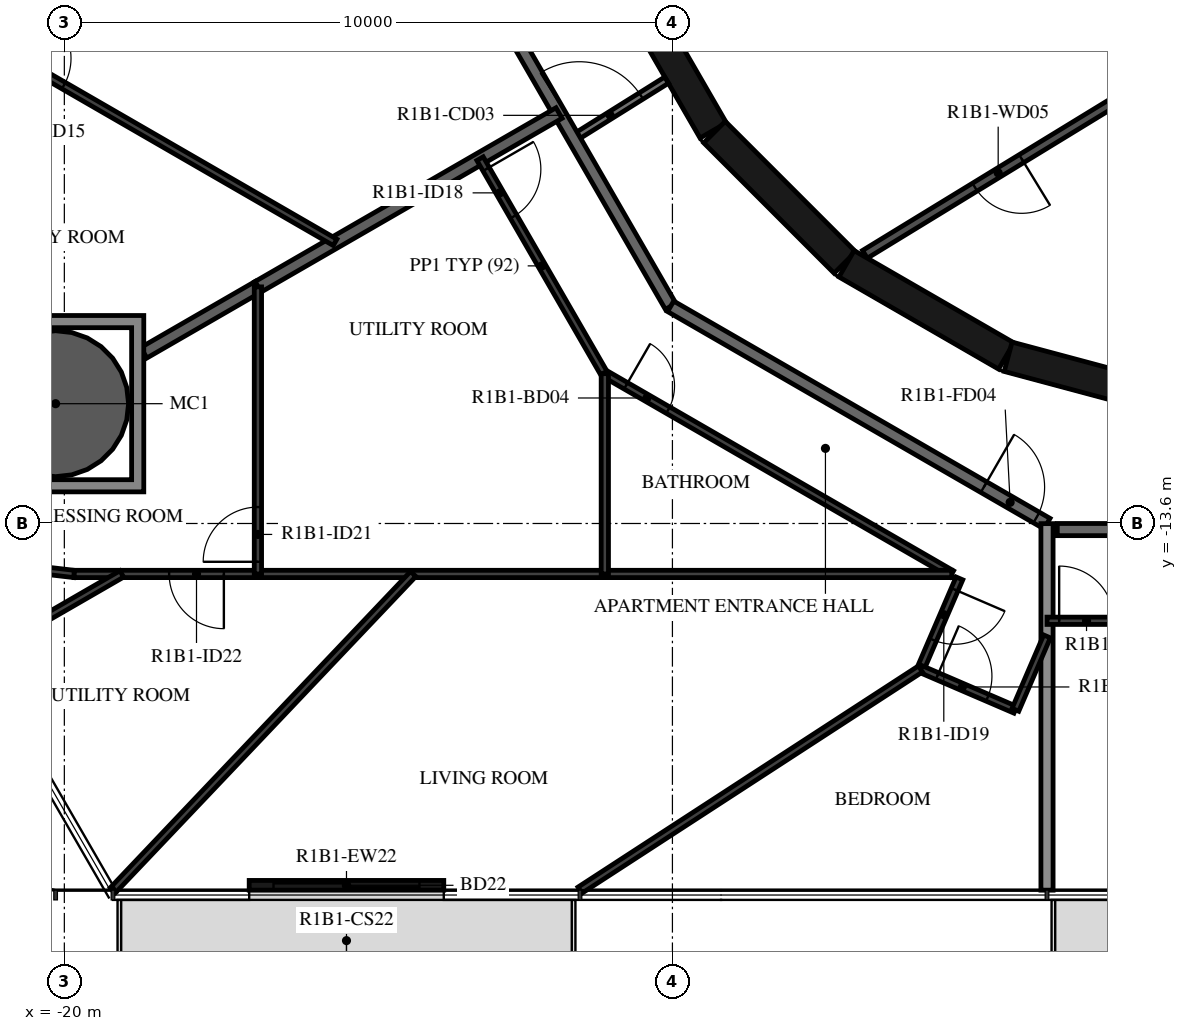
"""IFC4 building model, lengths in metres.
Left out: names, types, materials, properties, quantities, classifications, styles, units other than length and angle.
Written with IfcOpenShell. Run it as: python <this file> out.ifc"""

import sys

from ifc_helpers import new_model, si_unit, direction, frame, frame_2d, origin, origin_2d, place, context, subcontext, project, spatial, polyline, rectangle, hollow_circle, outline, extrude, element, fill, save


model = new_model("IFC4")
c1 = context("Model", 3, precision=1e-05, world=origin(), true_north=direction((0.0, 1.0)))
c2 = subcontext(c1, "Body", "Model", "MODEL_VIEW")
j1 = project(units=[si_unit("LENGTHUNIT", "METRE"), si_unit("PLANEANGLEUNIT", "RADIAN")], contexts=[c1])
p1 = place(None, origin())
s1 = spatial("IfcSite", under=j1, at=p1, CompositionType="ELEMENT")
p2 = place(p1, origin())
s2 = spatial("IfcBuilding", under=s1, at=p2, CompositionType="ELEMENT")
p3 = place(p2, frame((0.0, 0.0, 48.9)))
s3 = spatial("IfcBuildingStorey", under=s2, at=p3, CompositionType="ELEMENT", Elevation=48.9)
p4 = place(p3, frame((-20.144, -11.63, -0.38), z_axis=(0.0, 0.0, 1.0), x_axis=(1.0, 0.0, 0.0)))
e1 = element("IfcColumn", 1, at=p4, inside=s3, PredefinedType="COLUMN", context=c2, shape_type="SweptSolid", body=[
    extrude(hollow_circle(Radius=1.2, WallThickness=0.06, at=origin_2d()), origin(), (0.0, 0.0, 1.0), 3.5),
])
p5 = place(p3, frame((-16.96, -19.55, 0.0), z_axis=(0.0, 0.0, 1.0), x_axis=(1.0, 0.0, 0.0)))
e2 = element("IfcWall", 2, at=p5, inside=s3, PredefinedType="STANDARD", context=c2, shape_type="SweptSolid", body=[
    extrude(rectangle(XDim=3.2, YDim=0.16, at=frame_2d((1.6, 0.0))), origin(), (0.0, 0.0, 1.0), 3.12),
])
p6 = place(p5, frame((0.4, 0.0, 0.0)))
e3 = element("IfcOpeningElement", 3, at=p6, cuts=e2, PredefinedType="OPENING", context=c2, shape_type="SweptSolid", body=[
    extrude(rectangle(XDim=2.4, YDim=2.4, at=frame_2d((1.2, 1.2))), frame((0.0, 0.09, 0.0), z_axis=(0.0, -1.0, 0.0), x_axis=(1.0, 0.0, 0.0)), (0.0, 0.0, 1.0), 0.18),
])
p7 = place(p3, frame((-10.845, -4.51, 0.0), z_axis=(0.0, 0.0, 1.0), x_axis=(0.500087131594, -0.865975092491, 0.0)))
e4 = element("IfcWall", 4, at=p7, inside=s3, PredefinedType="SHEAR", context=c2, shape_type="SweptSolid", body=[
    extrude(rectangle(XDim=3.033, YDim=0.5, at=frame_2d((1.516, 0.0))), origin(), (0.0, 0.0, 1.0), 3.12),
])
p8 = place(p3, frame((-9.308, -7.164, 0.0), z_axis=(0.0, 0.0, 1.0), x_axis=(0.707106781187, -0.707106781187, 0.0)))
e5 = element("IfcWall", 5, at=p8, inside=s3, PredefinedType="SHEAR", context=c2, shape_type="SweptSolid", body=[
    extrude(rectangle(XDim=3.032, YDim=0.5, at=frame_2d((1.516, 0.0))), origin(), (0.0, 0.0, 1.0), 3.12),
])
for number, where, z_axis, x_axis in (
    (6, (-7.137, -9.329, 0.0), (0.0, 0.0, 1.0), (0.866, -0.5, 0.0)),
    (7, (-4.479, -10.858, 0.0), (0.0, 0.0, 1.0), (0.966, -0.259, 0.0)),
):
    element("IfcWall", number, at=place(p3, frame(where, z_axis=z_axis, x_axis=x_axis)), inside=s3, PredefinedType="SHEAR", context=c2, shape_type="SweptSolid", body=[
        extrude(rectangle(XDim=3.033, YDim=0.5, at=frame_2d((1.516, 0.0))), origin(), (0.0, 0.0, 1.0), 3.12),
    ])
p9 = place(p3, frame((-2.451, -6.495, 0.0), z_axis=(0.0, 0.0, 1.0), x_axis=(-0.853250115418, -0.521501908471, 0.0)))
e8 = element("IfcWall", 8, at=p9, inside=s3, PredefinedType="PARTITIONING", context=c2, shape_type="SweptSolid", body=[
    extrude(rectangle(XDim=5.137, YDim=0.15, at=frame_2d((2.569, 0.0))), origin(), (0.0, 0.0, 1.0), 3.12),
])
p10 = place(p9, frame((2.119, 0.0, 0.0)))
e9 = element("IfcOpeningElement", 9, at=p10, cuts=e8, PredefinedType="OPENING", context=c2, shape_type="SweptSolid", body=[
    extrude(rectangle(XDim=0.9, YDim=2.1, at=frame_2d((0.45, 1.05))), frame((0.0, 0.085, 0.0), z_axis=(0.0, -1.0, 0.0), x_axis=(1.0, 0.0, 0.0)), (0.0, 0.0, 1.0), 0.17),
])
p11 = place(p3, frame((-11.625, -7.264, 0.0), z_axis=(0.0, 0.0, 1.0), x_axis=(0.84803632456, 0.529938102259, 0.0)))
e10 = element("IfcWall", 10, at=p11, inside=s3, PredefinedType="PARTITIONING", context=c2, shape_type="SweptSolid", body=[
    extrude(rectangle(XDim=1.804, YDim=0.12, at=frame_2d((0.902, 0.0))), origin(), (0.0, 0.0, 1.0), 3.12),
])
p12 = place(p11, frame((0.11, 0.0, 0.0)))
e11 = element("IfcOpeningElement", 11, at=p12, cuts=e10, PredefinedType="OPENING", context=c2, shape_type="SweptSolid", body=[
    extrude(rectangle(XDim=1.2, YDim=2.1, at=frame_2d((0.6, 1.05))), frame((0.0, 0.07, 0.0), z_axis=(0.0, -1.0, 0.0), x_axis=(1.0, 0.0, 0.0)), (0.0, 0.0, 1.0), 0.14),
])
p13 = place(p3, frame((-13.7, -3.671, 0.0), z_axis=(0.0, 0.0, 1.0), x_axis=(0.500001669485, -0.866024439905, 0.0)))
e12 = element("IfcWall", 12, at=p13, inside=s3, PredefinedType="STANDARD", context=c2, shape_type="SweptSolid", body=[
    extrude(rectangle(XDim=7.342, YDim=0.2, at=frame_2d((3.671, 0.0))), origin(), (0.0, 0.0, 1.0), 3.12),
])
p14 = place(p3, frame((-10.029, -10.029, 0.0), z_axis=(0.0, 0.0, 1.0), x_axis=(0.866022878987, -0.500004373052, 0.0)))
e13 = element("IfcWall", 13, at=p14, inside=s3, PredefinedType="STANDARD", context=c2, shape_type="SweptSolid", body=[
    extrude(rectangle(XDim=7.146, YDim=0.2, at=frame_2d((3.573, 0.0))), origin(), (0.0, 0.0, 1.0), 3.12),
])
p15 = place(p14, frame((5.947, 0.0, 0.0)))
e14 = element("IfcOpeningElement", 14, at=p15, cuts=e13, PredefinedType="OPENING", context=c2, shape_type="SweptSolid", body=[
    extrude(rectangle(XDim=1.0, YDim=2.1, at=frame_2d((0.5, 1.05))), frame((0.0, 0.11, 0.0), z_axis=(0.0, -1.0, 0.0), x_axis=(1.0, 0.0, 0.0)), (0.0, 0.0, 1.0), 0.22),
])
p16 = place(p3, frame((-3.671, -13.7, 0.0), z_axis=(0.0, 0.0, 1.0), x_axis=(1.0, 0.0, 0.0)))
e15 = element("IfcWall", 15, at=p16, inside=s3, PredefinedType="STANDARD", context=c2, shape_type="SweptSolid", body=[
    extrude(rectangle(XDim=7.342, YDim=0.2, at=frame_2d((3.671, 0.0))), origin(), (0.0, 0.0, 1.0), 3.12),
])
p17 = place(p16, frame((2.1, 0.0, 0.0)))
e16 = element("IfcOpeningElement", 16, at=p17, cuts=e15, PredefinedType="OPENING", context=c2, shape_type="SweptSolid", body=[
    extrude(rectangle(XDim=1.0, YDim=2.1, at=frame_2d((0.5, 1.05))), frame((0.0, 0.11, 0.0), z_axis=(0.0, -1.0, 0.0), x_axis=(1.0, 0.0, 0.0)), (0.0, 0.0, 1.0), 0.22),
])
p18 = place(p3, frame((-16.817, -9.709, 0.0), z_axis=(0.0, 0.0, 1.0), x_axis=(0.86604338933, 0.499968846828, 0.0)))
e17 = element("IfcWall", 17, at=p18, inside=s3, PredefinedType="STANDARD", context=c2, shape_type="SweptSolid", body=[
    extrude(rectangle(XDim=5.718, YDim=0.2, at=frame_2d((2.859, 0.0))), origin(), (0.0, 0.0, 1.0), 3.12),
])
p19 = place(p3, frame((-18.694, -10.793, 0.0), z_axis=(0.0, 0.0, 1.0), x_axis=(0.866009251978, 0.500027974705, 0.0)))
e18 = element("IfcWall", 18, at=p19, inside=s3, PredefinedType="STANDARD", context=c2, shape_type="SweptSolid", body=[
    extrude(rectangle(XDim=2.167, YDim=0.2, at=frame_2d((1.084, 0.0))), origin(), (0.0, 0.0, 1.0), 3.12),
])
p20 = place(p3, frame((-3.84, -19.63, 0.0), z_axis=(0.0, 0.0, 1.0), x_axis=(0.0, 1.0, 0.0)))
e19 = element("IfcWall", 19, at=p20, inside=s3, PredefinedType="STANDARD", context=c2, shape_type="SweptSolid", body=[
    extrude(rectangle(XDim=6.028, YDim=0.2, at=frame_2d((3.014, 0.0))), origin(), (0.0, 0.0, 1.0), 2.73),
])
p21 = place(p3, frame((-17.13, 0.79, 0.0), z_axis=(0.0, 0.0, 1.0), x_axis=(-0.499997052475, -0.866027105532, 0.0)))
e20 = element("IfcWall", 20, at=p21, inside=s3, PredefinedType="PARTITIONING", context=c2, shape_type="SweptSolid", body=[
    extrude(rectangle(XDim=12.006, YDim=0.12, at=frame_2d((6.003, 0.0))), origin(), (0.0, 0.0, 1.0), 3.12),
])
p22 = place(p21, frame((1.498, 0.0, 0.0)))
e21 = element("IfcOpeningElement", 21, at=p22, cuts=e20, PredefinedType="OPENING", context=c2, shape_type="SweptSolid", body=[
    extrude(rectangle(XDim=0.9, YDim=2.1, at=frame_2d((0.45, 1.05))), frame((0.0, 0.07, 0.0), z_axis=(0.0, -1.0, 0.0), x_axis=(1.0, 0.0, 0.0)), (0.0, 0.0, 1.0), 0.14),
])
p23 = place(p3, frame((-20.963, -5.85, 0.0), z_axis=(0.0, 0.0, 1.0), x_axis=(0.866021746608, -0.500006334362, 0.0)))
e22 = element("IfcWall", 22, at=p23, inside=s3, PredefinedType="PARTITIONING", context=c2, shape_type="SweptSolid", body=[
    extrude(rectangle(XDim=6.253, YDim=0.12, at=frame_2d((3.127, 0.0))), origin(), (0.0, 0.0, 1.0), 3.12),
])
p24 = place(p23, frame((0.2, 0.0, 0.0)))
e23 = element("IfcOpeningElement", 23, at=p24, cuts=e22, PredefinedType="OPENING", context=c2, shape_type="SweptSolid", body=[
    extrude(rectangle(XDim=0.9, YDim=2.1, at=frame_2d((0.45, 1.05))), frame((0.0, 0.07, 0.0), z_axis=(0.0, -1.0, 0.0), x_axis=(1.0, 0.0, 0.0)), (0.0, 0.0, 1.0), 0.14),
])
p25 = place(p3, frame((-13.164, -7.6, 0.0), z_axis=(0.0, 0.0, 1.0), x_axis=(0.500000928893, -0.866024867487, 0.0)))
e24 = element("IfcWall", 24, at=p25, inside=s3, PredefinedType="PARTITIONING", context=c2, shape_type="SweptSolid", body=[
    extrude(rectangle(XDim=4.073, YDim=0.12, at=frame_2d((2.036, 0.0))), origin(), (0.0, 0.0, 1.0), 3.12),
])
p26 = place(p25, frame((0.2, 0.0, 0.0)))
e25 = element("IfcOpeningElement", 25, at=p26, cuts=e24, PredefinedType="OPENING", context=c2, shape_type="SweptSolid", body=[
    extrude(rectangle(XDim=0.9, YDim=2.1, at=frame_2d((0.45, 1.05))), frame((0.0, 0.07, 0.0), z_axis=(0.0, -1.0, 0.0), x_axis=(1.0, 0.0, 0.0)), (0.0, 0.0, 1.0), 0.14),
])
p27 = place(p3, frame((-5.28, -14.503, 0.0), z_axis=(0.0, 0.0, 1.0), x_axis=(-0.395209511122, -0.918591009274, 0.0)))
e26 = element("IfcWall", 26, at=p27, inside=s3, PredefinedType="PARTITIONING", context=c2, shape_type="SweptSolid", body=[
    extrude(rectangle(XDim=1.621, YDim=0.12, at=frame_2d((0.811, 0.0))), origin(), (0.0, 0.0, 1.0), 3.12),
])
p28 = place(p27, frame((0.2, 0.0, 0.0)))
e27 = element("IfcOpeningElement", 27, at=p28, cuts=e26, PredefinedType="OPENING", context=c2, shape_type="SweptSolid", body=[
    extrude(rectangle(XDim=0.9, YDim=2.1, at=frame_2d((0.45, 1.05))), frame((0.0, 0.07, 0.0), z_axis=(0.0, -1.0, 0.0), x_axis=(1.0, 0.0, 0.0)), (0.0, 0.0, 1.0), 0.14),
])
p29 = place(p3, frame((-11.112, -11.136, 0.0), z_axis=(0.0, 0.0, 1.0), x_axis=(0.866017718408, -0.500013311227, 0.0)))
e28 = element("IfcWall", 28, at=p29, inside=s3, PredefinedType="PARTITIONING", context=c2, shape_type="SweptSolid", body=[
    extrude(rectangle(XDim=6.588, YDim=0.12, at=frame_2d((3.294, 0.0))), origin(), (0.0, 0.0, 1.0), 3.12),
])
p30 = place(p29, frame((0.4, 0.0, 0.0)))
e29 = element("IfcOpeningElement", 29, at=p30, cuts=e28, PredefinedType="OPENING", context=c2, shape_type="SweptSolid", body=[
    extrude(rectangle(XDim=0.8, YDim=2.1, at=frame_2d((0.4, 1.05))), frame((0.0, 0.07, 0.0), z_axis=(0.0, -1.0, 0.0), x_axis=(1.0, 0.0, 0.0)), (0.0, 0.0, 1.0), 0.14),
])
p31 = place(p3, frame((-5.921, -15.992, 0.0), z_axis=(0.0, 0.0, 1.0), x_axis=(0.918557080237, -0.395288363536, 0.0)))
e30 = element("IfcWall", 30, at=p31, inside=s3, PredefinedType="PARTITIONING", context=c2, shape_type="SweptSolid", body=[
    extrude(rectangle(XDim=1.7, YDim=0.12, at=frame_2d((0.85, 0.0))), origin(), (0.0, 0.0, 1.0), 3.12),
])
p32 = place(p31, frame((0.3, 0.0, 0.0)))
e31 = element("IfcOpeningElement", 31, at=p32, cuts=e30, PredefinedType="OPENING", context=c2, shape_type="SweptSolid", body=[
    extrude(rectangle(XDim=0.9, YDim=2.1, at=frame_2d((0.45, 1.05))), frame((0.0, 0.07, 0.0), z_axis=(0.0, -1.0, 0.0), x_axis=(1.0, 0.0, 0.0)), (0.0, 0.0, 1.0), 0.14),
])
p33 = place(p3, frame((-4.36, -16.664, 0.0), z_axis=(0.0, 0.0, 1.0), x_axis=(0.395353859705, 0.918528892097, 0.0)))
e32 = element("IfcWall", 32, at=p33, inside=s3, PredefinedType="PARTITIONING", context=c2, shape_type="SweptSolid", body=[
    extrude(rectangle(XDim=1.314, YDim=0.12, at=frame_2d((0.657, 0.0))), origin(), (0.0, 0.0, 1.0), 3.12),
])
p34 = place(p3, frame((-5.407, -14.43, 0.0), z_axis=(0.0, 0.0, 1.0), x_axis=(-1.0, 0.0, 0.0)))
e33 = element("IfcWall", 33, at=p34, inside=s3, PredefinedType="PARTITIONING", context=c2, shape_type="SweptSolid", body=[
    extrude(rectangle(XDim=14.434, YDim=0.12, at=frame_2d((7.217, 0.0))), origin(), (0.0, 0.0, 1.0), 3.12),
])
p35 = place(p34, frame((11.97, 0.0, 0.0)))
e34 = element("IfcOpeningElement", 34, at=p35, cuts=e33, PredefinedType="OPENING", context=c2, shape_type="SweptSolid", body=[
    extrude(rectangle(XDim=0.9, YDim=2.1, at=frame_2d((0.45, 1.05))), frame((0.0, 0.07, 0.0), z_axis=(0.0, -1.0, 0.0), x_axis=(1.0, 0.0, 0.0)), (0.0, 0.0, 1.0), 0.14),
])
p36 = place(p3, frame((-19.841, -14.43, 0.0), z_axis=(0.0, 0.0, 1.0), x_axis=(-0.993245320107, 0.116033331788, 0.0)))
e35 = element("IfcWall", 35, at=p36, inside=s3, PredefinedType="PARTITIONING", context=c2, shape_type="SweptSolid", body=[
    extrude(rectangle(XDim=0.947, YDim=0.12, at=frame_2d((0.473, 0.0))), origin(), (0.0, 0.0, 1.0), 3.12),
])
p37 = place(p3, frame((-25.068, -17.901, 0.0), z_axis=(0.0, 0.0, 1.0), x_axis=(0.866025136247, 0.500000463387, 0.0)))
e36 = element("IfcWall", 36, at=p37, inside=s3, PredefinedType="PARTITIONING", context=c2, shape_type="SweptSolid", body=[
    extrude(rectangle(XDim=6.943, YDim=0.12, at=frame_2d((3.471, 0.0))), origin(), (0.0, 0.0, 1.0), 3.12),
])
p38 = place(p37, frame((0.4, 0.0, 0.0)))
e37 = element("IfcOpeningElement", 37, at=p38, cuts=e36, PredefinedType="OPENING", context=c2, shape_type="SweptSolid", body=[
    extrude(rectangle(XDim=0.9, YDim=2.1, at=frame_2d((0.45, 1.05))), frame((0.0, 0.07, 0.0), z_axis=(0.0, -1.0, 0.0), x_axis=(1.0, 0.0, 0.0)), (0.0, 0.0, 1.0), 0.14),
])
p39 = place(p3, frame((-16.817, -14.43, 0.0), z_axis=(0.0, 0.0, 1.0), x_axis=(0.0, 1.0, 0.0)))
e38 = element("IfcWall", 38, at=p39, inside=s3, PredefinedType="PARTITIONING", context=c2, shape_type="SweptSolid", body=[
    extrude(rectangle(XDim=4.721, YDim=0.12, at=frame_2d((2.36, 0.0))), origin(), (0.0, 0.0, 1.0), 3.12),
])
p40 = place(p39, frame((0.2, 0.0, 0.0)))
e39 = element("IfcOpeningElement", 39, at=p40, cuts=e38, PredefinedType="OPENING", context=c2, shape_type="SweptSolid", body=[
    extrude(rectangle(XDim=0.9, YDim=2.1, at=frame_2d((0.45, 1.05))), frame((0.0, 0.07, 0.0), z_axis=(0.0, -1.0, 0.0), x_axis=(1.0, 0.0, 0.0)), (0.0, 0.0, 1.0), 0.14),
])
p41 = place(p3, frame((-11.112, -14.43, 0.0), z_axis=(0.0, 0.0, 1.0), x_axis=(0.0, 1.0, 0.0)))
e40 = element("IfcWall", 40, at=p41, inside=s3, PredefinedType="PARTITIONING", context=c2, shape_type="SweptSolid", body=[
    extrude(rectangle(XDim=3.294, YDim=0.12, at=frame_2d((1.647, 0.0))), origin(), (0.0, 0.0, 1.0), 3.12),
])
p42 = place(p3, frame((-19.2, -19.63, 0.0), z_axis=(0.0, 0.0, 1.0), x_axis=(0.688551680792, 0.72518727435, 0.0)))
e41 = element("IfcWall", 41, at=p42, inside=s3, PredefinedType="PARTITIONING", context=c2, shape_type="SweptSolid", body=[
    extrude(rectangle(XDim=7.17, YDim=0.12, at=frame_2d((3.585, 0.0))), origin(), (0.0, 0.0, 1.0), 3.12),
])
p43 = place(p3, frame((-11.52, -19.63, 0.0), z_axis=(0.0, 0.0, 1.0), x_axis=(0.838545516556, 0.544831548888, 0.0)))
e42 = element("IfcWall", 42, at=p43, inside=s3, PredefinedType="PARTITIONING", context=c2, shape_type="SweptSolid", body=[
    extrude(rectangle(XDim=6.677, YDim=0.12, at=frame_2d((3.339, 0.0))), origin(), (0.0, 0.0, 1.0), 3.12),
])
p44 = place(p3, frame((-3.84, -15.2, 0.0), z_axis=(0.0, 0.0, 1.0), x_axis=(1.0, 0.0, 0.0)))
e43 = element("IfcWall", 43, at=p44, inside=s3, PredefinedType="PARTITIONING", context=c2, shape_type="SweptSolid", body=[
    extrude(rectangle(XDim=4.052, YDim=0.12, at=frame_2d((2.026, 0.0))), origin(), (0.0, 0.0, 1.0), 3.12),
])
p45 = place(p44, frame((0.2, 0.0, 0.0)))
e44 = element("IfcOpeningElement", 44, at=p45, cuts=e43, PredefinedType="OPENING", context=c2, shape_type="SweptSolid", body=[
    extrude(rectangle(XDim=0.9, YDim=2.1, at=frame_2d((0.45, 1.05))), frame((0.0, 0.07, 0.0), z_axis=(0.0, -1.0, 0.0), x_axis=(1.0, 0.0, 0.0)), (0.0, 0.0, 1.0), 0.14),
])
p46 = place(p3, origin())
e45 = element("IfcWall", 45, at=p46, inside=s3, PredefinedType="STANDARD", context=c2, shape_type="SweptSolid", body=[
    extrude(outline(polyline([(-18.694, -10.18), (-18.694, -13.08), (-21.594, -13.08), (-21.594, -10.18), (-18.694, -10.18)]), holes=[polyline([(-21.394, -12.88), (-18.894, -12.88), (-18.894, -10.38), (-21.394, -10.38), (-21.394, -12.88)])]), origin(), (0.0, 0.0, 1.0), 3.12),
])
p47 = place(p6, origin())
e46 = element("IfcDoor", 46, at=p47, inside=s3, OperationType="DOUBLE_DOOR_SLIDING", PredefinedType="DOOR", context=c2, shape_type="SweptSolid", body=[
    extrude(rectangle(XDim=2.4, YDim=2.4, at=frame_2d((1.2, 1.2))), frame((0.0, 0.025, 0.0), z_axis=(0.0, -1.0, 0.0), x_axis=(1.0, 0.0, 0.0)), (0.0, 0.0, 1.0), 0.05),
])
fill(e3, e46)
p48 = place(p10, origin())
e47 = element("IfcDoor", 47, at=p48, inside=s3, OperationType="SINGLE_SWING_RIGHT", PredefinedType="DOOR", context=c2, shape_type="SweptSolid", body=[
    extrude(rectangle(XDim=0.9, YDim=2.1, at=frame_2d((0.45, 1.05))), frame((0.0, 0.025, 0.0), z_axis=(0.0, -1.0, 0.0), x_axis=(1.0, 0.0, 0.0)), (0.0, 0.0, 1.0), 0.05),
])
fill(e9, e47)
p49 = place(p24, origin())
e48 = element("IfcDoor", 48, at=p49, inside=s3, OperationType="SINGLE_SWING_RIGHT", PredefinedType="DOOR", context=c2, shape_type="SweptSolid", body=[
    extrude(rectangle(XDim=0.9, YDim=2.1, at=frame_2d((0.45, 1.05))), frame((0.0, 0.025, 0.0), z_axis=(0.0, -1.0, 0.0), x_axis=(1.0, 0.0, 0.0)), (0.0, 0.0, 1.0), 0.05),
])
fill(e23, e48)
p50 = place(p15, origin())
e49 = element("IfcDoor", 49, at=p50, inside=s3, OperationType="SINGLE_SWING_LEFT", PredefinedType="DOOR", context=c2, shape_type="SweptSolid", body=[
    extrude(rectangle(XDim=1.0, YDim=2.1, at=frame_2d((0.5, 1.05))), frame((0.0, 0.025, 0.0), z_axis=(0.0, -1.0, 0.0), x_axis=(1.0, 0.0, 0.0)), (0.0, 0.0, 1.0), 0.05),
])
fill(e14, e49)
p51 = place(p26, origin())
e50 = element("IfcDoor", 50, at=p51, inside=s3, OperationType="SINGLE_SWING_LEFT", PredefinedType="DOOR", context=c2, shape_type="SweptSolid", body=[
    extrude(rectangle(XDim=0.9, YDim=2.1, at=frame_2d((0.45, 1.05))), frame((0.0, 0.025, 0.0), z_axis=(0.0, -1.0, 0.0), x_axis=(1.0, 0.0, 0.0)), (0.0, 0.0, 1.0), 0.05),
])
fill(e25, e50)
p52 = place(p28, origin())
e51 = element("IfcDoor", 51, at=p52, inside=s3, OperationType="SINGLE_SWING_RIGHT", PredefinedType="DOOR", context=c2, shape_type="SweptSolid", body=[
    extrude(rectangle(XDim=0.9, YDim=2.1, at=frame_2d((0.45, 1.05))), frame((0.0, 0.025, 0.0), z_axis=(0.0, -1.0, 0.0), x_axis=(1.0, 0.0, 0.0)), (0.0, 0.0, 1.0), 0.05),
])
fill(e27, e51)
p53 = place(p30, origin())
e52 = element("IfcDoor", 52, at=p53, inside=s3, OperationType="SINGLE_SWING_LEFT", PredefinedType="DOOR", context=c2, shape_type="SweptSolid", body=[
    extrude(rectangle(XDim=0.8, YDim=2.1, at=frame_2d((0.4, 1.05))), frame((0.0, 0.025, 0.0), z_axis=(0.0, -1.0, 0.0), x_axis=(1.0, 0.0, 0.0)), (0.0, 0.0, 1.0), 0.05),
])
fill(e29, e52)
p54 = place(p32, origin())
e53 = element("IfcDoor", 53, at=p54, inside=s3, OperationType="SINGLE_SWING_LEFT", PredefinedType="DOOR", context=c2, shape_type="SweptSolid", body=[
    extrude(rectangle(XDim=0.9, YDim=2.1, at=frame_2d((0.45, 1.05))), frame((0.0, 0.025, 0.0), z_axis=(0.0, -1.0, 0.0), x_axis=(1.0, 0.0, 0.0)), (0.0, 0.0, 1.0), 0.05),
])
fill(e31, e53)
p55 = place(p40, origin())
e54 = element("IfcDoor", 54, at=p55, inside=s3, OperationType="SINGLE_SWING_LEFT", PredefinedType="DOOR", context=c2, shape_type="SweptSolid", body=[
    extrude(rectangle(XDim=0.9, YDim=2.1, at=frame_2d((0.45, 1.05))), frame((0.0, 0.025, 0.0), z_axis=(0.0, -1.0, 0.0), x_axis=(1.0, 0.0, 0.0)), (0.0, 0.0, 1.0), 0.05),
])
fill(e39, e54)
p56 = place(p35, origin())
e55 = element("IfcDoor", 55, at=p56, inside=s3, OperationType="SINGLE_SWING_LEFT", PredefinedType="DOOR", context=c2, shape_type="SweptSolid", body=[
    extrude(rectangle(XDim=0.9, YDim=2.1, at=frame_2d((0.45, 1.05))), frame((0.0, 0.025, 0.0), z_axis=(0.0, -1.0, 0.0), x_axis=(1.0, 0.0, 0.0)), (0.0, 0.0, 1.0), 0.05),
])
fill(e34, e55)
p57 = place(p45, origin())
e56 = element("IfcDoor", 56, at=p57, inside=s3, OperationType="SINGLE_SWING_LEFT", PredefinedType="DOOR", context=c2, shape_type="SweptSolid", body=[
    extrude(rectangle(XDim=0.9, YDim=2.1, at=frame_2d((0.45, 1.05))), frame((0.0, 0.025, 0.0), z_axis=(0.0, -1.0, 0.0), x_axis=(1.0, 0.0, 0.0)), (0.0, 0.0, 1.0), 0.05),
])
fill(e44, e56)
p58 = place(p12, origin())
e57 = element("IfcDoor", 57, at=p58, inside=s3, OperationType="DOUBLE_DOOR_SINGLE_SWING", PredefinedType="DOOR", context=c2, shape_type="SweptSolid", body=[
    extrude(rectangle(XDim=1.2, YDim=2.1, at=frame_2d((0.6, 1.05))), frame((0.0, 0.025, 0.0), z_axis=(0.0, -1.0, 0.0), x_axis=(1.0, 0.0, 0.0)), (0.0, 0.0, 1.0), 0.05),
])
fill(e11, e57)
save(model, sys.argv[1])
